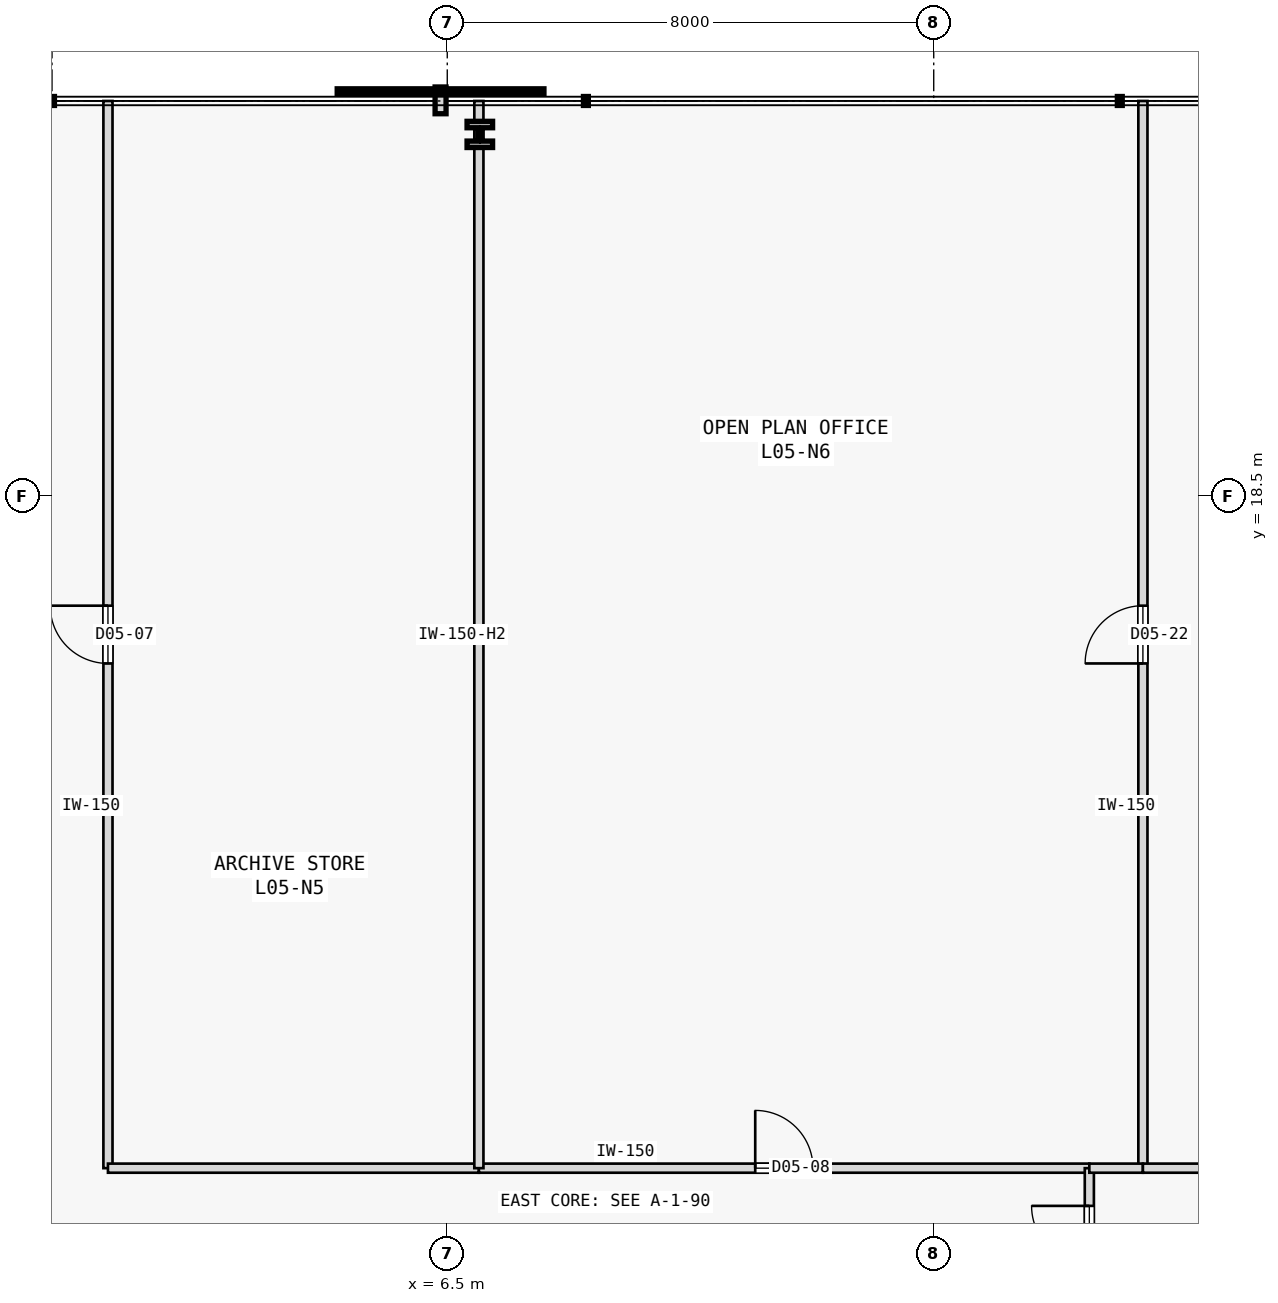
"""IFC4 building model, lengths in metres.
Left out: names, types, materials, properties, quantities, classifications, styles, units other than length and angle.
Written with IfcOpenShell. Run it as: python <this file> out.ifc"""

import sys

from ifc_helpers import new_model, si_unit, direction, frame, frame_2d, origin, origin_2d, place, context, subcontext, project, spatial, rectangle, i_section, extrude, element, fill, save


model = new_model("IFC4")
c1 = context("Model", 3, precision=1e-05, world=origin(), true_north=direction((0.0, 1.0)))
c2 = subcontext(c1, "Body", "Model", "MODEL_VIEW")
j1 = project(units=[si_unit("LENGTHUNIT", "METRE"), si_unit("PLANEANGLEUNIT", "RADIAN")], contexts=[c1])
p1 = place(None, origin())
s1 = spatial("IfcSite", under=j1, at=p1, CompositionType="ELEMENT")
p2 = place(p1, origin())
s2 = spatial("IfcBuilding", under=s1, at=p2, CompositionType="ELEMENT")
p3 = place(p2, frame((0.0, 0.0, 25.6)))
s3 = spatial("IfcBuildingStorey", under=s2, at=p3, CompositionType="ELEMENT", Elevation=25.6)
p4 = place(p3, frame((7.036, 24.45, 0.0), z_axis=(0.0, 0.0, 1.0), x_axis=(1.0, 0.0, 0.0)))
e1 = element("IfcColumn", 1, at=p4, inside=s3, PredefinedType="COLUMN", context=c2, shape_type="SweptSolid", body=[
    extrude(i_section(OverallWidth=0.42, OverallDepth=0.431, WebThickness=0.065, FlangeThickness=0.106, FilletRadius=0.015, at=origin_2d()), origin(), (0.0, 0.0, 1.0), 3.8),
])
p5 = place(p3, frame((0.92, 7.45, 0.0), z_axis=(0.0, 0.0, 1.0), x_axis=(0.0, 1.0, 0.0)))
e2 = element("IfcWall", 2, at=p5, inside=s3, PredefinedType="PARTITIONING", context=c2, shape_type="SweptSolid", body=[
    extrude(rectangle(XDim=17.55, YDim=0.15, at=frame_2d((8.775, 0.0))), origin(), (0.0, 0.0, 1.0), 3.575),
])
p6 = place(p5, frame((8.3, 0.0, 0.0)))
e3 = element("IfcOpeningElement", 3, at=p6, cuts=e2, PredefinedType="OPENING", context=c2, shape_type="SweptSolid", body=[
    extrude(rectangle(XDim=0.95, YDim=2.15, at=frame_2d((0.475, 1.075))), frame((0.0, 0.085, 0.0), z_axis=(0.0, -1.0, 0.0), x_axis=(1.0, 0.0, 0.0)), (0.0, 0.0, 1.0), 0.17),
])
p7 = place(p3, frame((0.92, 7.45, 0.0), z_axis=(0.0, 0.0, 1.0), x_axis=(1.0, 0.0, 0.0)))
e4 = element("IfcWall", 4, at=p7, inside=s3, PredefinedType="PARTITIONING", context=c2, shape_type="SweptSolid", body=[
    extrude(rectangle(XDim=6.1, YDim=0.15, at=frame_2d((3.05, 0.0))), origin(), (0.0, 0.0, 1.0), 3.575),
])
p8 = place(p3, frame((7.02, 7.45, 0.0), z_axis=(0.0, 0.0, 1.0), x_axis=(1.0, 0.0, 0.0)))
e5 = element("IfcWall", 5, at=p8, inside=s3, PredefinedType="PARTITIONING", context=c2, shape_type="SweptSolid", body=[
    extrude(rectangle(XDim=10.039, YDim=0.15, at=frame_2d((5.02, 0.0))), origin(), (0.0, 0.0, 1.0), 3.575),
])
p9 = place(p8, frame((4.544, 0.0, 0.0)))
e6 = element("IfcOpeningElement", 6, at=p9, cuts=e5, PredefinedType="OPENING", context=c2, shape_type="SweptSolid", body=[
    extrude(rectangle(XDim=0.95, YDim=2.15, at=frame_2d((0.475, 1.075))), frame((0.0, 0.085, 0.0), z_axis=(0.0, -1.0, 0.0), x_axis=(1.0, 0.0, 0.0)), (0.0, 0.0, 1.0), 0.17),
])
p10 = place(p3, frame((17.059, 4.321, 0.0), z_axis=(0.0, 0.0, 1.0), x_axis=(0.0, 1.0, 0.0)))
e7 = element("IfcWall", 7, at=p10, inside=s3, PredefinedType="PARTITIONING", context=c2, shape_type="SweptSolid", body=[
    extrude(rectangle(XDim=3.129, YDim=0.15, at=frame_2d((1.564, 0.0))), origin(), (0.0, 0.0, 1.0), 3.575),
])
p11 = place(p10, frame((1.559, 0.0, 0.0)))
e8 = element("IfcOpeningElement", 8, at=p11, cuts=e7, PredefinedType="OPENING", context=c2, shape_type="SweptSolid", body=[
    extrude(rectangle(XDim=0.95, YDim=2.15, at=frame_2d((0.475, 1.075))), frame((0.0, 0.085, 0.0), z_axis=(0.0, -1.0, 0.0), x_axis=(1.0, 0.0, 0.0)), (0.0, 0.0, 1.0), 0.17),
])
p12 = place(p3, frame((7.02, 7.45, 0.0), z_axis=(0.0, 0.0, 1.0), x_axis=(0.0, 1.0, 0.0)))
e9 = element("IfcWall", 9, at=p12, inside=s3, PredefinedType="PARTITIONING", context=c2, shape_type="SweptSolid", body=[
    extrude(rectangle(XDim=17.55, YDim=0.15, at=frame_2d((8.775, 0.0))), origin(), (0.0, 0.0, 1.0), 2.975),
])
p13 = place(p3, frame((17.94, 7.45, 0.0), z_axis=(0.0, 0.0, 1.0), x_axis=(0.0, 1.0, 0.0)))
e10 = element("IfcWall", 10, at=p13, inside=s3, PredefinedType="PARTITIONING", context=c2, shape_type="SweptSolid", body=[
    extrude(rectangle(XDim=17.55, YDim=0.15, at=frame_2d((8.775, 0.0))), origin(), (0.0, 0.0, 1.0), 3.575),
])
p14 = place(p13, frame((8.3, 0.0, 0.0)))
e11 = element("IfcOpeningElement", 11, at=p14, cuts=e10, PredefinedType="OPENING", context=c2, shape_type="SweptSolid", body=[
    extrude(rectangle(XDim=0.95, YDim=2.15, at=frame_2d((0.475, 1.075))), frame((0.0, 0.085, 0.0), z_axis=(0.0, -1.0, 0.0), x_axis=(1.0, 0.0, 0.0)), (0.0, 0.0, 1.0), 0.17),
])
p15 = place(p3, frame((17.059, 7.45, 0.0), z_axis=(0.0, 0.0, 1.0), x_axis=(1.0, 0.0, 0.0)))
e12 = element("IfcWall", 12, at=p15, inside=s3, PredefinedType="PARTITIONING", context=c2, shape_type="SweptSolid", body=[
    extrude(rectangle(XDim=0.881, YDim=0.15, at=frame_2d((0.44, 0.0))), origin(), (0.0, 0.0, 1.0), 3.575),
])
p16 = place(p3, frame((17.94, 7.45, 0.0), z_axis=(0.0, 0.0, 1.0), x_axis=(1.0, 0.0, 0.0)))
e13 = element("IfcWall", 13, at=p16, inside=s3, PredefinedType="PARTITIONING", context=c2, shape_type="SweptSolid", body=[
    extrude(rectangle(XDim=10.14, YDim=0.15, at=frame_2d((5.07, 0.0))), origin(), (0.0, 0.0, 1.0), 3.125),
])
p17 = place(p6, origin())
e14 = element("IfcDoor", 14, at=p17, inside=s3, OperationType="SINGLE_SWING_RIGHT", PredefinedType="DOOR", context=c2, shape_type="SweptSolid", body=[
    extrude(rectangle(XDim=0.95, YDim=2.15, at=frame_2d((0.475, 1.075))), frame((0.0, 0.025, 0.0), z_axis=(0.0, -1.0, 0.0), x_axis=(1.0, 0.0, 0.0)), (0.0, 0.0, 1.0), 0.05),
])
fill(e3, e14)
p18 = place(p9, origin())
e15 = element("IfcDoor", 15, at=p18, inside=s3, OperationType="SINGLE_SWING_LEFT", PredefinedType="DOOR", context=c2, shape_type="SweptSolid", body=[
    extrude(rectangle(XDim=0.95, YDim=2.15, at=frame_2d((0.475, 1.075))), frame((0.0, 0.025, 0.0), z_axis=(0.0, -1.0, 0.0), x_axis=(1.0, 0.0, 0.0)), (0.0, 0.0, 1.0), 0.05),
])
fill(e6, e15)
p19 = place(p11, origin())
e16 = element("IfcDoor", 16, at=p19, inside=s3, OperationType="SINGLE_SWING_RIGHT", PredefinedType="DOOR", context=c2, shape_type="SweptSolid", body=[
    extrude(rectangle(XDim=0.95, YDim=2.15, at=frame_2d((0.475, 1.075))), frame((0.0, 0.025, 0.0), z_axis=(0.0, -1.0, 0.0), x_axis=(1.0, 0.0, 0.0)), (0.0, 0.0, 1.0), 0.05),
])
fill(e8, e16)
p20 = place(p14, origin())
e17 = element("IfcDoor", 17, at=p20, inside=s3, OperationType="SINGLE_SWING_LEFT", PredefinedType="DOOR", context=c2, shape_type="SweptSolid", body=[
    extrude(rectangle(XDim=0.95, YDim=2.15, at=frame_2d((0.475, 1.075))), frame((0.0, 0.025, 0.0), z_axis=(0.0, -1.0, 0.0), x_axis=(1.0, 0.0, 0.0)), (0.0, 0.0, 1.0), 0.05),
])
fill(e11, e17)
save(model, sys.argv[1])
